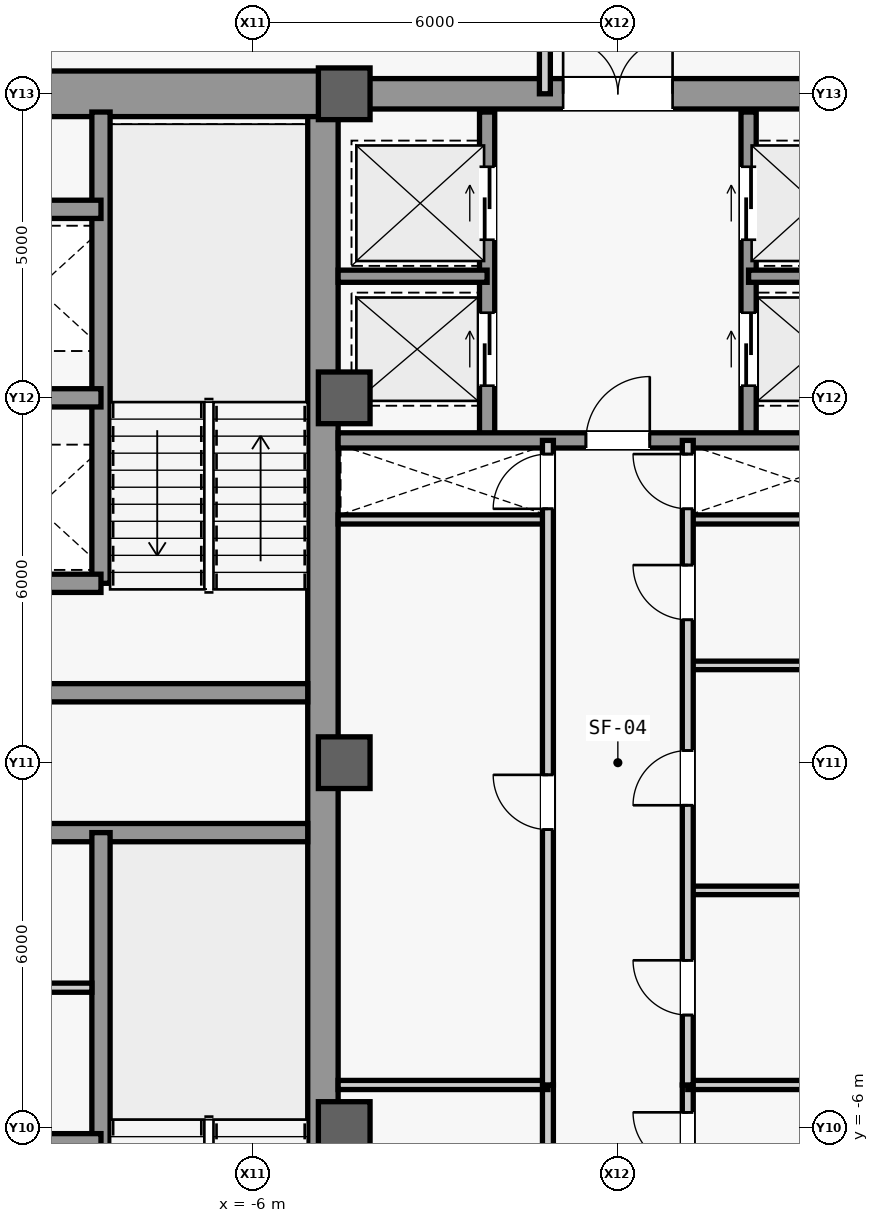
"""IFC4 building model, lengths in metres.
Left out: names, types, materials, properties, quantities, classifications, styles, units other than length and angle.
Written with IfcOpenShell. Run it as: python <this file> out.ifc"""

import sys

from ifc_helpers import new_model, si_unit, direction, frame, frame_2d, origin, origin_2d, place, context, subcontext, project, spatial, rectangle, extrude, source, transform, mapped, element, fill, save


model = new_model("IFC4")
c1 = context("Model", 3, precision=1e-05, world=origin(), true_north=direction((0.0, 1.0)))
c2 = subcontext(c1, "Body", "Model", "MODEL_VIEW")
j1 = project(units=[si_unit("LENGTHUNIT", "METRE"), si_unit("PLANEANGLEUNIT", "RADIAN")], contexts=[c1])
p1 = place(None, origin())
s1 = spatial("IfcSite", under=j1, at=p1, CompositionType="ELEMENT")
p2 = place(p1, origin())
s2 = spatial("IfcBuilding", under=s1, at=p2, CompositionType="ELEMENT")
p3 = place(p2, frame((0.0, 0.0, 183.1)))
s3 = spatial("IfcBuildingStorey", under=s2, at=p3, CompositionType="ELEMENT", Elevation=183.1)
m1 = source(origin(), c2, "Body", "SweptSolid", [
    extrude(rectangle(XDim=21.4, YDim=0.5, at=frame_2d((10.7, 0.0))), origin(), (0.0, 0.0, 1.0), 3.78),
])
p4 = place(p3, frame((-4.85, -10.7, 0.0), z_axis=(0.0, 0.0, 1.0), x_axis=(0.0, 1.0, 0.0)))
e1 = element("IfcWall", 1, at=p4, inside=s3, PredefinedType="SHEAR", context=c2, shape_type="MappedRepresentation", body=[
    mapped(m1, transform((0.0, 0.0, 0.0), scale=1.0)),
])
m2 = source(origin(), c2, "Body", "SweptSolid", [
    extrude(rectangle(XDim=5.85, YDim=0.75, at=frame_2d((2.925, 0.0))), origin(), (0.0, 0.0, 1.0), 3.78),
])
p5 = place(p3, frame((-10.7, 11.0, 0.0), z_axis=(0.0, 0.0, 1.0), x_axis=(1.0, 0.0, 0.0)))
e2 = element("IfcWall", 2, at=p5, inside=s3, PredefinedType="SHEAR", context=c2, shape_type="MappedRepresentation", body=[
    mapped(m2, transform((0.0, 0.0, 0.0), scale=1.0)),
])
m3 = source(origin(), c2, "Body", "SweptSolid", [
    extrude(rectangle(XDim=5.6, YDim=0.3, at=frame_2d((2.8, 0.0))), origin(), (0.0, 0.0, 1.0), 3.78),
])
for number, where, z_axis, x_axis in (
    (3, (-10.7, -1.15, 0.0), (0.0, 0.0, 1.0), (1.0, 0.0, 0.0)),
    (4, (-10.7, 1.15, 0.0), (0.0, 0.0, 1.0), (1.0, 0.0, 0.0)),
):
    element("IfcWall", number, at=place(p3, frame(where, z_axis=z_axis, x_axis=x_axis)), inside=s3, PredefinedType="SHEAR", context=c2, shape_type="MappedRepresentation", body=[
        mapped(m3, transform((0.0, 0.0, 0.0), scale=1.0)),
    ])
m4 = source(origin(), c2, "Body", "SweptSolid", [
    extrude(rectangle(XDim=9.2, YDim=0.5, at=frame_2d((4.6, 0.0))), origin(), (0.0, 0.0, 1.0), 3.78),
])
p6 = place(p3, frame((-4.6, 11.0, 0.0), z_axis=(0.0, 0.0, 1.0), x_axis=(1.0, 0.0, 0.0)))
e5 = element("IfcWall", 5, at=p6, inside=s3, PredefinedType="SHEAR", context=c2, shape_type="MappedRepresentation", body=[
    mapped(m4, transform((0.0, 0.0, 0.0), scale=1.0)),
])
m5 = source(origin(), c2, "Body", "SweptSolid", [
    extrude(rectangle(XDim=1.8, YDim=2.25, at=frame_2d((0.9, 1.125))), frame((0.0, 0.26, 0.0), z_axis=(0.0, -1.0, 0.0), x_axis=(1.0, 0.0, 0.0)), (0.0, 0.0, 1.0), 0.52),
])
p7 = place(p6, frame((3.7, 0.0, 0.0)))
e6 = element("IfcOpeningElement", 6, at=p7, cuts=e5, PredefinedType="OPENING", context=c2, shape_type="MappedRepresentation", body=[
    mapped(m5, transform((0.0, 0.0, 0.0), scale=1.0)),
])
m6 = source(origin(), c2, "Body", "SweptSolid", [
    extrude(rectangle(XDim=0.85, YDim=0.85, at=origin_2d()), origin(), (0.0, 0.0, 1.0), 4.0),
])
for number, where, z_axis, x_axis in (
    (7, (-4.5, -6.0, 0.0), (0.0, 0.0, 1.0), (1.0, 0.0, 0.0)),
    (8, (-4.5, 0.0, 0.0), (0.0, 0.0, 1.0), (1.0, 0.0, 0.0)),
    (9, (-4.5, 6.0, 0.0), (0.0, 0.0, 1.0), (1.0, 0.0, 0.0)),
    (10, (-4.5, 11.0, 0.0), (0.0, 0.0, 1.0), (1.0, 0.0, 0.0)),
):
    element("IfcColumn", number, at=place(p3, frame(where, z_axis=z_axis, x_axis=x_axis)), inside=s3, PredefinedType="COLUMN", context=c2, shape_type="MappedRepresentation", body=[
        mapped(m6, transform((0.0, 0.0, 0.0), scale=1.0)),
    ])
m7 = source(origin(), c2, "Body", "SweptSolid", [
    extrude(rectangle(XDim=7.8, YDim=0.3, at=frame_2d((3.9, 0.0))), origin(), (0.0, 0.0, 1.0), 3.78),
])
p8 = place(p3, frame((-8.5, -8.95, 0.0), z_axis=(0.0, 0.0, 1.0), x_axis=(0.0, 1.0, 0.0)))
e11 = element("IfcWall", 11, at=p8, inside=s3, PredefinedType="SHEAR", context=c2, shape_type="MappedRepresentation", body=[
    mapped(m7, transform((0.0, 0.0, 0.0), scale=1.0)),
])
m8 = source(origin(), c2, "Body", "SweptSolid", [
    extrude(rectangle(XDim=2.2, YDim=0.3, at=frame_2d((1.1, 0.0))), origin(), (0.0, 0.0, 1.0), 3.78),
])
p9 = place(p3, frame((-10.7, -6.25, 0.0), z_axis=(0.0, 0.0, 1.0), x_axis=(1.0, 0.0, 0.0)))
e12 = element("IfcWall", 12, at=p9, inside=s3, PredefinedType="SHEAR", context=c2, shape_type="MappedRepresentation", body=[
    mapped(m8, transform((0.0, 0.0, 0.0), scale=1.0)),
])
m9 = source(origin(), c2, "Body", "SweptSolid", [
    extrude(rectangle(XDim=7.75, YDim=0.3, at=frame_2d((3.875, 0.0))), origin(), (0.0, 0.0, 1.0), 3.78),
])
p10 = place(p3, frame((-8.5, 2.95, 0.0), z_axis=(0.0, 0.0, 1.0), x_axis=(0.0, 1.0, 0.0)))
e13 = element("IfcWall", 13, at=p10, inside=s3, PredefinedType="SHEAR", context=c2, shape_type="MappedRepresentation", body=[
    mapped(m9, transform((0.0, 0.0, 0.0), scale=1.0)),
])
for number, where, z_axis, x_axis in (
    (14, (-10.7, 2.95, 0.0), (0.0, 0.0, 1.0), (1.0, 0.0, 0.0)),
    (15, (-10.7, 6.0, 0.0), (0.0, 0.0, 1.0), (1.0, 0.0, 0.0)),
    (16, (-10.7, 9.1, 0.0), (0.0, 0.0, 1.0), (1.0, 0.0, 0.0)),
):
    element("IfcWall", number, at=place(p3, frame(where, z_axis=z_axis, x_axis=x_axis)), inside=s3, PredefinedType="SHEAR", context=c2, shape_type="MappedRepresentation", body=[
        mapped(m8, transform((0.0, 0.0, 0.0), scale=1.0)),
    ])
m10 = source(origin(), c2, "Body", "SweptSolid", [
    extrude(rectangle(XDim=2.05, YDim=0.15, at=frame_2d((1.025, 0.0))), origin(), (0.0, 0.0, 1.0), 3.78),
])
p11 = place(p3, frame((-10.7, -3.7, 0.0), z_axis=(0.0, 0.0, 1.0), x_axis=(1.0, 0.0, 0.0)))
e17 = element("IfcWall", 17, at=p11, inside=s3, PredefinedType="PARTITIONING", context=c2, shape_type="MappedRepresentation", body=[
    mapped(m10, transform((0.0, 0.0, 0.0), scale=1.0)),
])
m11 = source(origin(), c2, "Body", "SweptSolid", [
    extrude(rectangle(XDim=3.45, YDim=0.15, at=frame_2d((1.725, 0.0))), origin(), (0.0, 0.0, 1.0), 3.78),
])
for number, where, z_axis, x_axis in (
    (18, (-4.6, 4.0, 0.0), (0.0, 0.0, 1.0), (1.0, 0.0, 0.0)),
    (19, (1.15, 4.0, 0.0), (0.0, 0.0, 1.0), (1.0, 0.0, 0.0)),
):
    element("IfcWall", number, at=place(p3, frame(where, z_axis=z_axis, x_axis=x_axis)), inside=s3, PredefinedType="PARTITIONING", context=c2, shape_type="MappedRepresentation", body=[
        mapped(m11, transform((0.0, 0.0, 0.0), scale=1.0)),
    ])
m12 = source(origin(), c2, "Body", "SweptSolid", [
    extrude(rectangle(XDim=5.4, YDim=0.18, at=frame_2d((2.7, 0.0))), origin(), (0.0, 0.0, 1.0), 3.78),
])
p12 = place(p3, frame((-1.15, -10.7, 0.0), z_axis=(0.0, 0.0, 1.0), x_axis=(0.0, 1.0, 0.0)))
e20 = element("IfcWall", 20, at=p12, inside=s3, PredefinedType="PARTITIONING", context=c2, shape_type="MappedRepresentation", body=[
    mapped(m12, transform((0.0, 0.0, 0.0), scale=1.0)),
])
m13 = source(origin(), c2, "Body", "SweptSolid", [
    extrude(rectangle(XDim=0.9, YDim=2.15, at=frame_2d((0.45, 1.075))), frame((0.0, 0.1, 0.0), z_axis=(0.0, -1.0, 0.0), x_axis=(1.0, 0.0, 0.0)), (0.0, 0.0, 1.0), 0.2),
])
p13 = place(p12, frame((2.25, 0.0, 0.0)))
e21 = element("IfcOpeningElement", 21, at=p13, cuts=e20, PredefinedType="OPENING", context=c2, shape_type="MappedRepresentation", body=[
    mapped(m13, transform((0.0, 0.0, 0.0), scale=1.0)),
])
p14 = place(p3, frame((1.15, -10.7, 0.0), z_axis=(0.0, 0.0, 1.0), x_axis=(0.0, 1.0, 0.0)))
e22 = element("IfcWall", 22, at=p14, inside=s3, PredefinedType="PARTITIONING", context=c2, shape_type="MappedRepresentation", body=[
    mapped(m12, transform((0.0, 0.0, 0.0), scale=1.0)),
])
p15 = place(p14, frame((0.45, 0.0, 0.0)))
e23 = element("IfcOpeningElement", 23, at=p15, cuts=e22, PredefinedType="OPENING", context=c2, shape_type="MappedRepresentation", body=[
    mapped(m13, transform((0.0, 0.0, 0.0), scale=1.0)),
])
p16 = place(p14, frame((2.25, 0.0, 0.0)))
e24 = element("IfcOpeningElement", 24, at=p16, cuts=e22, PredefinedType="OPENING", context=c2, shape_type="MappedRepresentation", body=[
    mapped(m13, transform((0.0, 0.0, 0.0), scale=1.0)),
])
p17 = place(p14, frame((4.05, 0.0, 0.0)))
e25 = element("IfcOpeningElement", 25, at=p17, cuts=e22, PredefinedType="OPENING", context=c2, shape_type="MappedRepresentation", body=[
    mapped(m13, transform((0.0, 0.0, 0.0), scale=1.0)),
])
for number, where, z_axis, x_axis in (
    (26, (-4.6, -5.3, 0.0), (0.0, 0.0, 1.0), (1.0, 0.0, 0.0)),
    (27, (1.15, -5.3, 0.0), (0.0, 0.0, 1.0), (1.0, 0.0, 0.0)),
):
    element("IfcWall", number, at=place(p3, frame(where, z_axis=z_axis, x_axis=x_axis)), inside=s3, PredefinedType="PARTITIONING", context=c2, shape_type="MappedRepresentation", body=[
        mapped(m11, transform((0.0, 0.0, 0.0), scale=1.0)),
    ])
m14 = source(origin(), c2, "Body", "SweptSolid", [
    extrude(rectangle(XDim=5.4, YDim=0.25, at=frame_2d((2.7, 0.0))), origin(), (0.0, 0.0, 1.0), 3.78),
])
p18 = place(p3, frame((-2.15, 5.3, 0.0), z_axis=(0.0, 0.0, 1.0), x_axis=(0.0, 1.0, 0.0)))
e28 = element("IfcWall", 28, at=p18, inside=s3, PredefinedType="SHEAR", context=c2, shape_type="MappedRepresentation", body=[
    mapped(m14, transform((0.0, 0.0, 0.0), scale=1.0)),
])
m15 = source(origin(), c2, "Body", "SweptSolid", [
    extrude(rectangle(XDim=1.2, YDim=2.3, at=frame_2d((0.6, 1.15))), frame((0.0, 0.135, 0.0), z_axis=(0.0, -1.0, 0.0), x_axis=(1.0, 0.0, 0.0)), (0.0, 0.0, 1.0), 0.27),
])
p19 = place(p18, frame((3.3, 0.0, 0.0)))
e29 = element("IfcOpeningElement", 29, at=p19, cuts=e28, PredefinedType="OPENING", context=c2, shape_type="MappedRepresentation", body=[
    mapped(m15, transform((0.0, 0.0, 0.0), scale=1.0)),
])
p20 = place(p18, frame((0.9, 0.0, 0.0)))
e30 = element("IfcOpeningElement", 30, at=p20, cuts=e28, PredefinedType="OPENING", context=c2, shape_type="MappedRepresentation", body=[
    mapped(m15, transform((0.0, 0.0, 0.0), scale=1.0)),
])
p21 = place(p3, frame((2.15, 5.3, 0.0), z_axis=(0.0, 0.0, 1.0), x_axis=(0.0, 1.0, 0.0)))
e31 = element("IfcWall", 31, at=p21, inside=s3, PredefinedType="SHEAR", context=c2, shape_type="MappedRepresentation", body=[
    mapped(m14, transform((0.0, 0.0, 0.0), scale=1.0)),
])
p22 = place(p21, frame((3.3, 0.0, 0.0)))
e32 = element("IfcOpeningElement", 32, at=p22, cuts=e31, PredefinedType="OPENING", context=c2, shape_type="MappedRepresentation", body=[
    mapped(m15, transform((0.0, 0.0, 0.0), scale=1.0)),
])
p23 = place(p21, frame((0.9, 0.0, 0.0)))
e33 = element("IfcOpeningElement", 33, at=p23, cuts=e31, PredefinedType="OPENING", context=c2, shape_type="MappedRepresentation", body=[
    mapped(m15, transform((0.0, 0.0, 0.0), scale=1.0)),
])
m16 = source(origin(), c2, "Body", "SweptSolid", [
    extrude(rectangle(XDim=2.45, YDim=0.2, at=frame_2d((1.225, 0.0))), origin(), (0.0, 0.0, 1.0), 3.78),
])
for number, where, z_axis, x_axis in (
    (34, (-4.6, 8.0, 0.0), (0.0, 0.0, 1.0), (1.0, 0.0, 0.0)),
    (35, (2.15, 8.0, 0.0), (0.0, 0.0, 1.0), (1.0, 0.0, 0.0)),
):
    element("IfcWall", number, at=place(p3, frame(where, z_axis=z_axis, x_axis=x_axis)), inside=s3, PredefinedType="SHEAR", context=c2, shape_type="MappedRepresentation", body=[
        mapped(m16, transform((0.0, 0.0, 0.0), scale=1.0)),
    ])
m17 = source(origin(), c2, "Body", "SweptSolid", [
    extrude(rectangle(XDim=9.2, YDim=0.25, at=frame_2d((4.6, 0.0))), origin(), (0.0, 0.0, 1.0), 3.78),
])
p24 = place(p3, frame((-4.6, 5.3, 0.0), z_axis=(0.0, 0.0, 1.0), x_axis=(1.0, 0.0, 0.0)))
e36 = element("IfcWall", 36, at=p24, inside=s3, PredefinedType="SHEAR", context=c2, shape_type="MappedRepresentation", body=[
    mapped(m17, transform((0.0, 0.0, 0.0), scale=1.0)),
])
m18 = source(origin(), c2, "Body", "SweptSolid", [
    extrude(rectangle(XDim=1.05, YDim=2.2, at=frame_2d((0.525, 1.1))), frame((0.0, 0.135, 0.0), z_axis=(0.0, -1.0, 0.0), x_axis=(1.0, 0.0, 0.0)), (0.0, 0.0, 1.0), 0.27),
])
p25 = place(p24, frame((4.075, 0.0, 0.0)))
e37 = element("IfcOpeningElement", 37, at=p25, cuts=e36, PredefinedType="OPENING", context=c2, shape_type="MappedRepresentation", body=[
    mapped(m18, transform((0.0, 0.0, 0.0), scale=1.0)),
])
m19 = source(origin(), c2, "Body", "SweptSolid", [
    extrude(rectangle(XDim=10.6, YDim=0.18, at=frame_2d((5.3, 0.0))), origin(), (0.0, 0.0, 1.0), 3.78),
])
p26 = place(p3, frame((-1.15, -5.3, 0.0), z_axis=(0.0, 0.0, 1.0), x_axis=(0.0, 1.0, 0.0)))
e38 = element("IfcWall", 38, at=p26, inside=s3, PredefinedType="PARTITIONING", context=c2, shape_type="MappedRepresentation", body=[
    mapped(m19, transform((0.0, 0.0, 0.0), scale=1.0)),
])
p27 = place(p26, frame((4.2, 0.0, 0.0)))
e39 = element("IfcOpeningElement", 39, at=p27, cuts=e38, PredefinedType="OPENING", context=c2, shape_type="MappedRepresentation", body=[
    mapped(m13, transform((0.0, 0.0, 0.0), scale=1.0)),
])
p28 = place(p26, frame((9.475, 0.0, 0.0)))
e40 = element("IfcOpeningElement", 40, at=p28, cuts=e38, PredefinedType="OPENING", context=c2, shape_type="MappedRepresentation", body=[
    mapped(m13, transform((0.0, 0.0, 0.0), scale=1.0)),
])
m20 = source(origin(), c2, "Body", "SweptSolid", [
    extrude(rectangle(XDim=3.45, YDim=0.14, at=frame_2d((1.725, 0.0))), origin(), (0.0, 0.0, 1.0), 3.78),
])
for number, where, z_axis, x_axis in (
    (41, (1.15, -2.1, 0.0), (0.0, 0.0, 1.0), (1.0, 0.0, 0.0)),
    (42, (1.15, 1.6, 0.0), (0.0, 0.0, 1.0), (1.0, 0.0, 0.0)),
):
    element("IfcWall", number, at=place(p3, frame(where, z_axis=z_axis, x_axis=x_axis)), inside=s3, PredefinedType="PARTITIONING", context=c2, shape_type="MappedRepresentation", body=[
        mapped(m20, transform((0.0, 0.0, 0.0), scale=1.0)),
    ])
p29 = place(p3, frame((1.15, -5.3, 0.0), z_axis=(0.0, 0.0, 1.0), x_axis=(0.0, 1.0, 0.0)))
e43 = element("IfcWall", 43, at=p29, inside=s3, PredefinedType="PARTITIONING", context=c2, shape_type="MappedRepresentation", body=[
    mapped(m19, transform((0.0, 0.0, 0.0), scale=1.0)),
])
p30 = place(p29, frame((1.15, 0.0, 0.0)))
e44 = element("IfcOpeningElement", 44, at=p30, cuts=e43, PredefinedType="OPENING", context=c2, shape_type="MappedRepresentation", body=[
    mapped(m13, transform((0.0, 0.0, 0.0), scale=1.0)),
])
p31 = place(p29, frame((4.6, 0.0, 0.0)))
e45 = element("IfcOpeningElement", 45, at=p31, cuts=e43, PredefinedType="OPENING", context=c2, shape_type="MappedRepresentation", body=[
    mapped(m13, transform((0.0, 0.0, 0.0), scale=1.0)),
])
p32 = place(p29, frame((7.65, 0.0, 0.0)))
e46 = element("IfcOpeningElement", 46, at=p32, cuts=e43, PredefinedType="OPENING", context=c2, shape_type="MappedRepresentation", body=[
    mapped(m13, transform((0.0, 0.0, 0.0), scale=1.0)),
])
p33 = place(p29, frame((9.475, 0.0, 0.0)))
e47 = element("IfcOpeningElement", 47, at=p33, cuts=e43, PredefinedType="OPENING", context=c2, shape_type="MappedRepresentation", body=[
    mapped(m13, transform((0.0, 0.0, 0.0), scale=1.0)),
])
m21 = source(origin(), c2, "Body", "SweptSolid", [
    extrude(rectangle(XDim=3.1, YDim=0.18, at=frame_2d((1.55, 0.0))), origin(), (0.0, 0.0, 1.0), 3.78),
])
p34 = place(p3, frame((-1.2, 11.0, 0.0), z_axis=(0.0, 0.0, 1.0), x_axis=(0.0, 1.0, 0.0)))
e48 = element("IfcWall", 48, at=p34, inside=s3, PredefinedType="PARTITIONING", context=c2, shape_type="MappedRepresentation", body=[
    mapped(m21, transform((0.0, 0.0, 0.0), scale=1.0)),
])
m22 = source(origin(), c2, "Body", "SweptSolid", [
    extrude(rectangle(XDim=0.9, YDim=2.15, at=frame_2d((0.45, 1.075))), frame((0.0, 0.025, 0.0), z_axis=(0.0, -1.0, 0.0), x_axis=(1.0, 0.0, 0.0)), (0.0, 0.0, 1.0), 0.05),
])
p35 = place(p17, origin())
e49 = element("IfcDoor", 49, at=p35, inside=s3, OperationType="SINGLE_SWING_RIGHT", PredefinedType="DOOR", context=c2, shape_type="MappedRepresentation", body=[
    mapped(m22, transform((0.0, 0.0, 0.0), scale=1.0)),
])
fill(e25, e49)
m23 = source(origin(), c2, "Body", "SweptSolid", [
    extrude(rectangle(XDim=1.05, YDim=2.2, at=frame_2d((0.525, 1.1))), frame((0.0, 0.025, 0.0), z_axis=(0.0, -1.0, 0.0), x_axis=(1.0, 0.0, 0.0)), (0.0, 0.0, 1.0), 0.05),
])
p36 = place(p25, origin())
e50 = element("IfcDoor", 50, at=p36, inside=s3, OperationType="SINGLE_SWING_RIGHT", PredefinedType="DOOR", context=c2, shape_type="MappedRepresentation", body=[
    mapped(m23, transform((0.0, 0.0, 0.0), scale=1.0)),
])
fill(e37, e50)
m24 = source(origin(), c2, "Body", "SweptSolid", [
    extrude(rectangle(XDim=1.8, YDim=2.25, at=frame_2d((0.9, 1.125))), frame((0.0, 0.025, 0.0), z_axis=(0.0, -1.0, 0.0), x_axis=(1.0, 0.0, 0.0)), (0.0, 0.0, 1.0), 0.05),
])
p37 = place(p7, origin())
e51 = element("IfcDoor", 51, at=p37, inside=s3, OperationType="SINGLE_SWING_RIGHT", PredefinedType="DOOR", context=c2, shape_type="MappedRepresentation", body=[
    mapped(m24, transform((0.0, 0.0, 0.0), scale=1.0)),
])
fill(e6, e51)
p38 = place(p27, origin())
e52 = element("IfcDoor", 52, at=p38, inside=s3, OperationType="SINGLE_SWING_RIGHT", PredefinedType="DOOR", context=c2, shape_type="MappedRepresentation", body=[
    mapped(m22, transform((0.0, 0.0, 0.0), scale=1.0)),
])
fill(e39, e52)
p39 = place(p30, origin())
e53 = element("IfcDoor", 53, at=p39, inside=s3, OperationType="SINGLE_SWING_RIGHT", PredefinedType="DOOR", context=c2, shape_type="MappedRepresentation", body=[
    mapped(m22, transform((0.0, 0.0, 0.0), scale=1.0)),
])
fill(e44, e53)
p40 = place(p31, origin())
e54 = element("IfcDoor", 54, at=p40, inside=s3, OperationType="SINGLE_SWING_LEFT", PredefinedType="DOOR", context=c2, shape_type="MappedRepresentation", body=[
    mapped(m22, transform((0.0, 0.0, 0.0), scale=1.0)),
])
fill(e45, e54)
p41 = place(p32, origin())
e55 = element("IfcDoor", 55, at=p41, inside=s3, OperationType="SINGLE_SWING_RIGHT", PredefinedType="DOOR", context=c2, shape_type="MappedRepresentation", body=[
    mapped(m22, transform((0.0, 0.0, 0.0), scale=1.0)),
])
fill(e46, e55)
p42 = place(p28, origin())
e56 = element("IfcDoor", 56, at=p42, inside=s3, OperationType="SINGLE_SWING_LEFT", PredefinedType="DOOR", context=c2, shape_type="MappedRepresentation", body=[
    mapped(m22, transform((0.0, 0.0, 0.0), scale=1.0)),
])
fill(e40, e56)
p43 = place(p33, origin())
e57 = element("IfcDoor", 57, at=p43, inside=s3, OperationType="SINGLE_SWING_RIGHT", PredefinedType="DOOR", context=c2, shape_type="MappedRepresentation", body=[
    mapped(m22, transform((0.0, 0.0, 0.0), scale=1.0)),
])
fill(e47, e57)
m25 = source(origin(), c2, "Body", "SweptSolid", [
    extrude(rectangle(XDim=1.2, YDim=2.3, at=frame_2d((0.6, 1.15))), frame((0.0, 0.025, 0.0), z_axis=(0.0, -1.0, 0.0), x_axis=(1.0, 0.0, 0.0)), (0.0, 0.0, 1.0), 0.05),
])
p44 = place(p19, origin())
e58 = element("IfcDoor", 58, at=p44, inside=s3, OperationType="SLIDING_TO_LEFT", PredefinedType="DOOR", context=c2, shape_type="MappedRepresentation", body=[
    mapped(m25, transform((0.0, 0.0, 0.0), scale=1.0)),
])
fill(e29, e58)
p45 = place(p22, origin())
e59 = element("IfcDoor", 59, at=p45, inside=s3, OperationType="SLIDING_TO_LEFT", PredefinedType="DOOR", context=c2, shape_type="MappedRepresentation", body=[
    mapped(m25, transform((0.0, 0.0, 0.0), scale=1.0)),
])
fill(e32, e59)
p46 = place(p20, origin())
e60 = element("IfcDoor", 60, at=p46, inside=s3, OperationType="SLIDING_TO_LEFT", PredefinedType="DOOR", context=c2, shape_type="MappedRepresentation", body=[
    mapped(m25, transform((0.0, 0.0, 0.0), scale=1.0)),
])
fill(e30, e60)
p47 = place(p23, origin())
e61 = element("IfcDoor", 61, at=p47, inside=s3, OperationType="SLIDING_TO_LEFT", PredefinedType="DOOR", context=c2, shape_type="MappedRepresentation", body=[
    mapped(m25, transform((0.0, 0.0, 0.0), scale=1.0)),
])
fill(e33, e61)
save(model, sys.argv[1])
